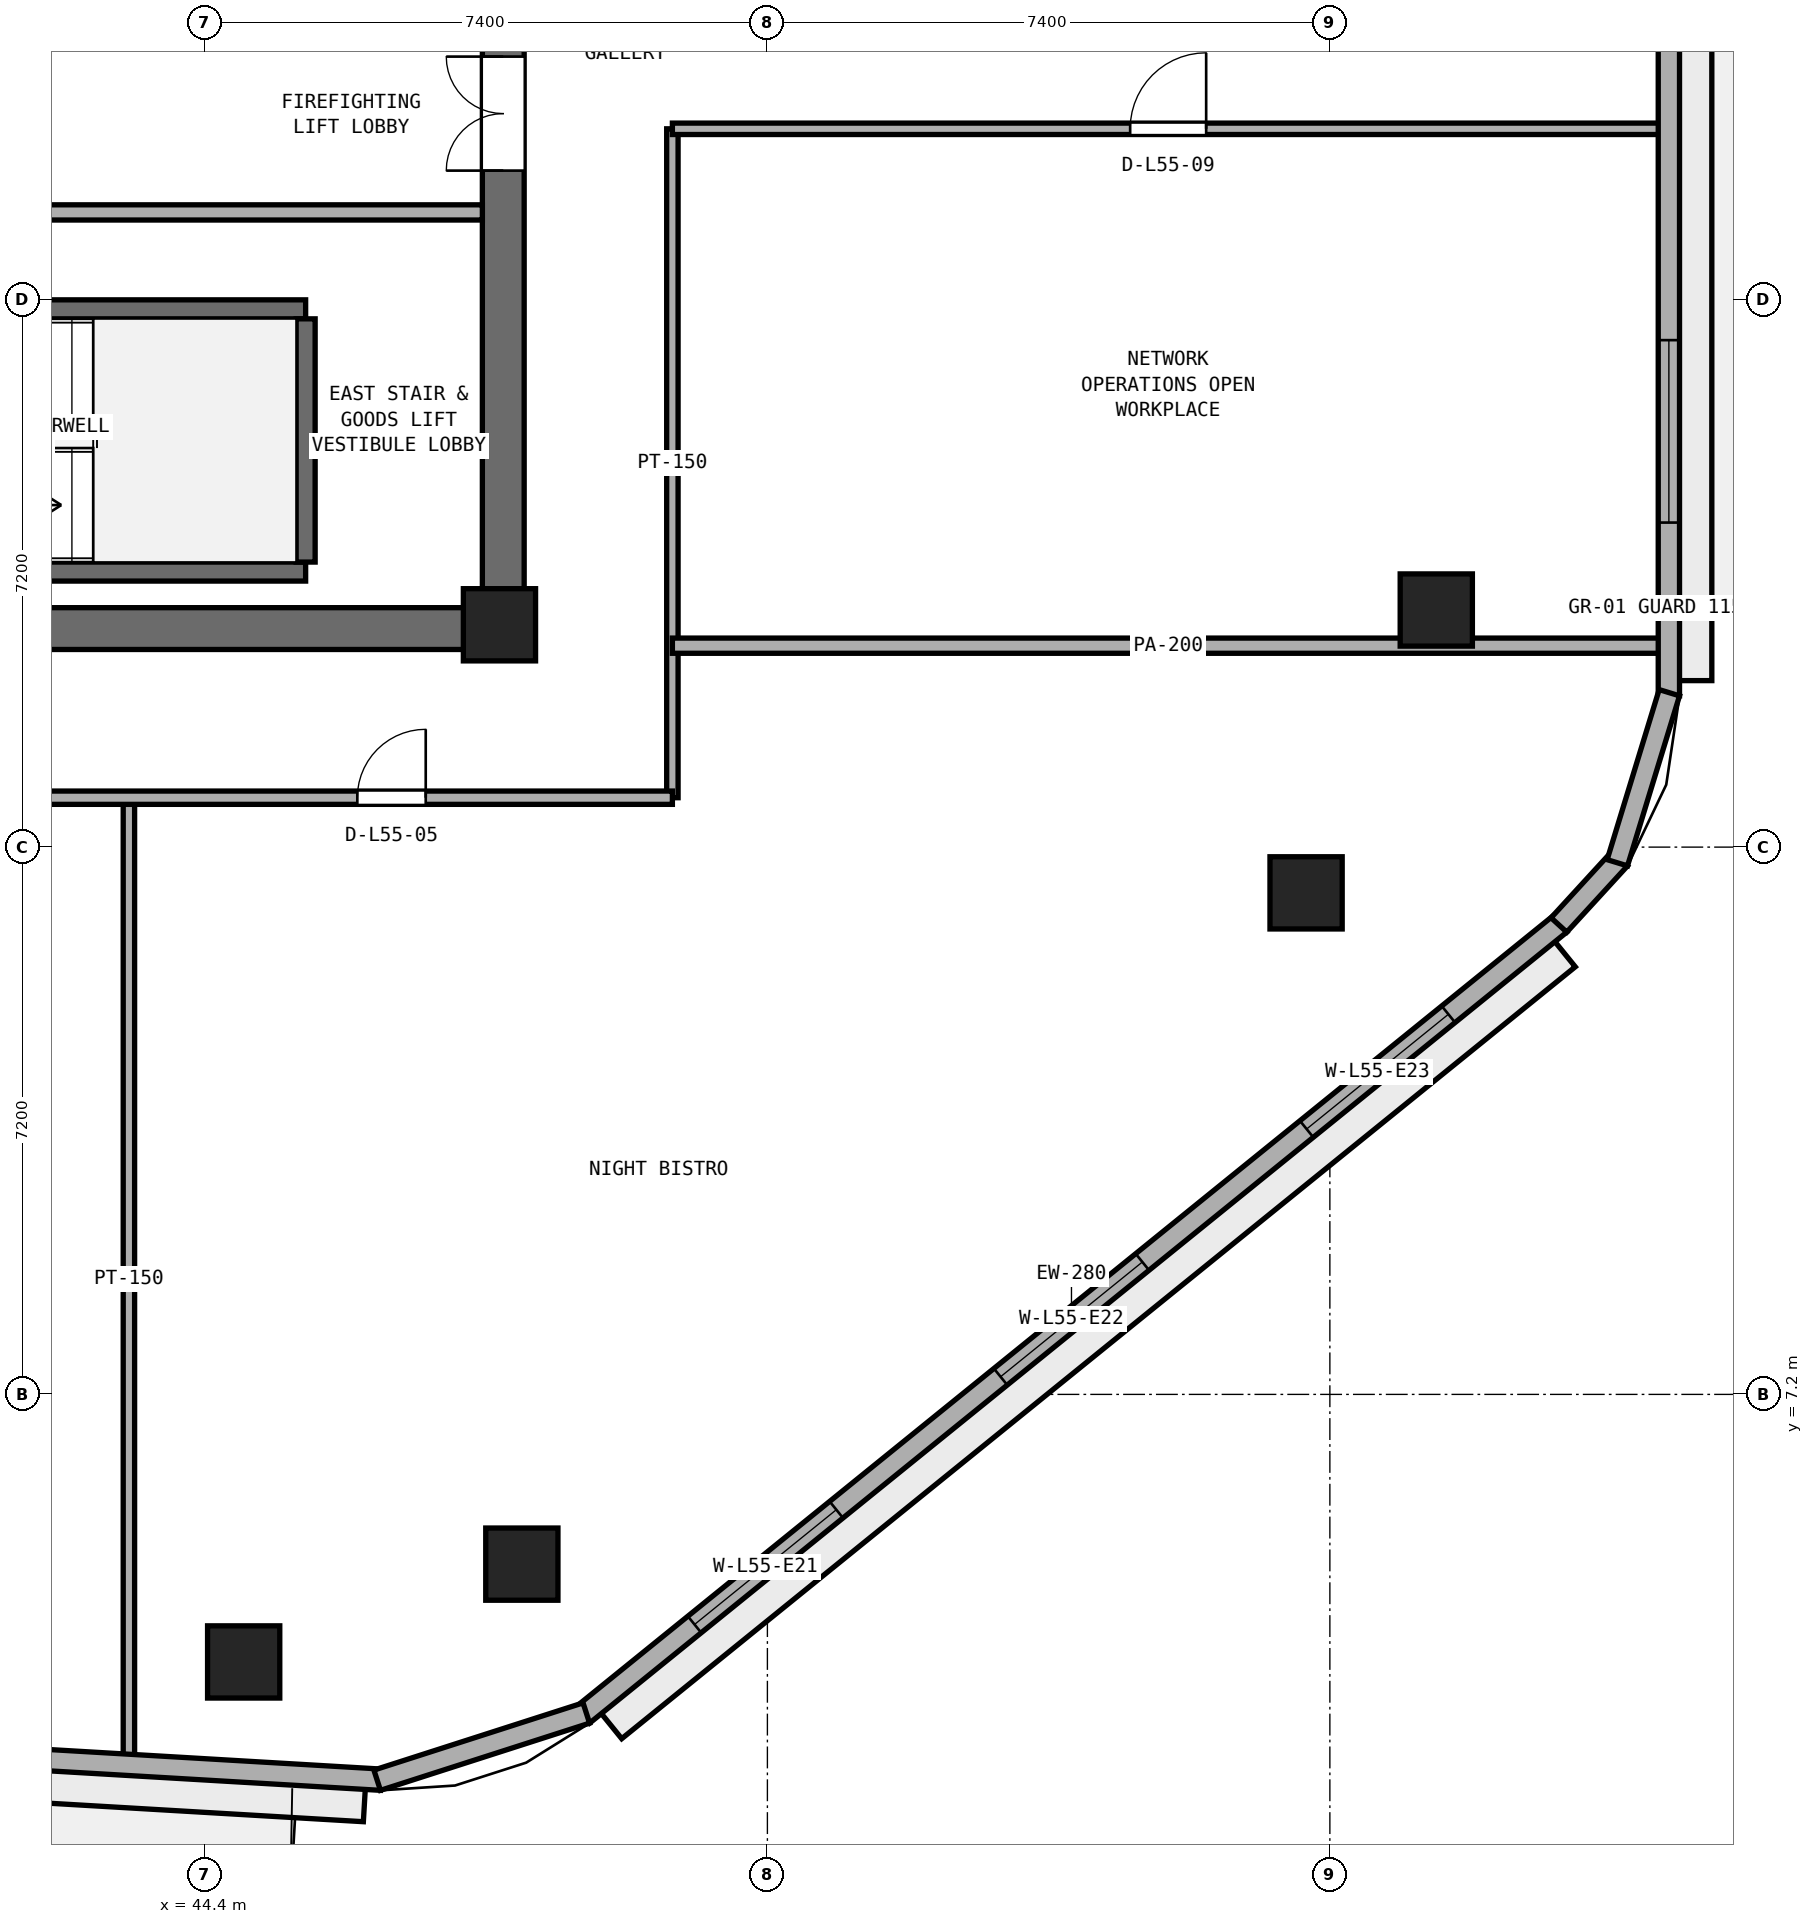
"""IFC4 building model, lengths in metres.
Left out: names, types, materials, properties, quantities, classifications, styles, units other than length and angle.
Written with IfcOpenShell. Run it as: python <this file> out.ifc"""

import sys

from ifc_helpers import new_model, si_unit, direction, frame, frame_2d, origin, origin_2d, place, context, subcontext, project, spatial, rectangle, extrude, element, fill, save


model = new_model("IFC4")
c1 = context("Model", 3, precision=1e-05, world=origin(), true_north=direction((0.0, 1.0)))
c2 = subcontext(c1, "Body", "Model", "MODEL_VIEW")
j1 = project(units=[si_unit("LENGTHUNIT", "METRE"), si_unit("PLANEANGLEUNIT", "RADIAN")], contexts=[c1])
p1 = place(None, origin())
s1 = spatial("IfcSite", under=j1, at=p1, CompositionType="ELEMENT")
p2 = place(p1, origin())
s2 = spatial("IfcBuilding", under=s1, at=p2, CompositionType="ELEMENT")
p3 = place(p2, frame((0.0, 0.0, 216.2)))
s3 = spatial("IfcBuildingStorey", under=s2, at=p3, CompositionType="ELEMENT", Elevation=216.2)
p4 = place(p3, frame((25.4, 17.275, 0.0), z_axis=(0.0, 0.0, 1.0), x_axis=(1.0, 0.0, 0.0)))
e1 = element("IfcWall", 1, at=p4, inside=s3, PredefinedType="SHEAR", context=c2, shape_type="SweptSolid", body=[
    extrude(rectangle(XDim=23.2, YDim=0.55, at=frame_2d((11.6, 0.0))), origin(), (0.0, 0.0, 1.0), 3.4),
])
p5 = place(p3, frame((48.325, 17.55, 0.0), z_axis=(0.0, 0.0, 1.0), x_axis=(0.0, 1.0, 0.0)))
e2 = element("IfcWall", 2, at=p5, inside=s3, PredefinedType="SHEAR", context=c2, shape_type="SweptSolid", body=[
    extrude(rectangle(XDim=15.3, YDim=0.55, at=frame_2d((7.65, 0.0))), origin(), (0.0, 0.0, 1.0), 3.4),
])
p6 = place(p5, frame((5.75, 0.0, 0.0)))
e3 = element("IfcOpeningElement", 3, at=p6, cuts=e2, PredefinedType="OPENING", context=c2, shape_type="SweptSolid", body=[
    extrude(rectangle(XDim=1.5, YDim=2.15, at=frame_2d((0.75, 1.075))), frame((0.0, 0.285, 0.0), z_axis=(0.0, -1.0, 0.0), x_axis=(1.0, 0.0, 0.0)), (0.0, 0.0, 1.0), 0.57),
])
p7 = place(p3, frame((48.275, 17.325, 0.0), z_axis=(0.0, 0.0, 1.0), x_axis=(1.0, 0.0, 0.0)))
e4 = element("IfcColumn", 4, at=p7, inside=s3, PredefinedType="PILASTER", context=c2, shape_type="SweptSolid", body=[
    extrude(rectangle(XDim=0.95, YDim=0.95, at=origin_2d()), origin(), (0.0, 0.0, 1.0), 3.8),
])
for number, where, z_axis, x_axis in (
    (5, (44.91, 3.68, 0.0), (0.0, 0.0, 1.0), (1.0, 0.0, 0.0)),
    (6, (48.57, 4.967, 0.0), (0.0, 0.0, 1.0), (1.0, 0.0, 0.0)),
    (7, (58.887, 13.798, 0.0), (0.0, 0.0, 1.0), (1.0, 0.0, 0.0)),
    (8, (60.6, 17.519, 0.0), (0.0, 0.0, 1.0), (1.0, 0.0, 0.0)),
):
    element("IfcColumn", number, at=place(p3, frame(where, z_axis=z_axis, x_axis=x_axis)), inside=s3, PredefinedType="COLUMN", context=c2, shape_type="SweptSolid", body=[
        extrude(rectangle(XDim=0.95, YDim=0.95, at=origin_2d()), origin(), (0.0, 0.0, 1.0), 3.8),
    ])
for number, where, z_axis, x_axis in (
    (9, (38.425, 18.025, 0.0), (0.0, 0.0, 1.0), (1.0, 0.0, 0.0)),
    (10, (38.425, 21.475, 0.0), (0.0, 0.0, 1.0), (1.0, 0.0, 0.0)),
):
    element("IfcWall", number, at=place(p3, frame(where, z_axis=z_axis, x_axis=x_axis)), inside=s3, PredefinedType="SHEAR", context=c2, shape_type="SweptSolid", body=[
        extrude(rectangle(XDim=7.3, YDim=0.25, at=frame_2d((3.65, 0.0))), origin(), (0.0, 0.0, 1.0), 3.4),
    ])
p8 = place(p3, frame((45.725, 18.15, 0.0), z_axis=(0.0, 0.0, 1.0), x_axis=(0.0, 1.0, 0.0)))
e11 = element("IfcWall", 11, at=p8, inside=s3, PredefinedType="SHEAR", context=c2, shape_type="SweptSolid", body=[
    extrude(rectangle(XDim=3.2, YDim=0.25, at=frame_2d((1.6, 0.0))), origin(), (0.0, 0.0, 1.0), 3.4),
])
p9 = place(p3, frame((42.0, 22.75, 0.0), z_axis=(0.0, 0.0, 1.0), x_axis=(1.0, 0.0, 0.0)))
e12 = element("IfcWall", 12, at=p9, inside=s3, PredefinedType="SOLIDWALL", context=c2, shape_type="SweptSolid", body=[
    extrude(rectangle(XDim=6.05, YDim=0.2, at=frame_2d((3.025, 0.0))), origin(), (0.0, 0.0, 1.0), 3.4),
])
p10 = place(p3, frame((50.55, 15.05, 0.0), z_axis=(0.0, 0.0, 1.0), x_axis=(0.0, 1.0, 0.0)))
e13 = element("IfcWall", 13, at=p10, inside=s3, PredefinedType="PARTITIONING", context=c2, shape_type="SweptSolid", body=[
    extrude(rectangle(XDim=8.8, YDim=0.15, at=frame_2d((4.4, 0.0))), origin(), (0.0, 0.0, 1.0), 3.4),
])
p11 = place(p3, frame((43.4, 2.391, 0.0), z_axis=(0.0, 0.0, 1.0), x_axis=(0.0, 1.0, 0.0)))
e14 = element("IfcWall", 14, at=p11, inside=s3, PredefinedType="PARTITIONING", context=c2, shape_type="SweptSolid", body=[
    extrude(rectangle(XDim=12.659, YDim=0.15, at=frame_2d((6.33, 0.0))), origin(), (0.0, 0.0, 1.0), 3.4),
])
p12 = place(p3, frame((23.45, 15.05, 0.0), z_axis=(0.0, 0.0, 1.0), x_axis=(1.0, 0.0, 0.0)))
e15 = element("IfcWall", 15, at=p12, inside=s3, PredefinedType="PARTITIONING", context=c2, shape_type="SweptSolid", body=[
    extrude(rectangle(XDim=27.1, YDim=0.175, at=frame_2d((13.55, 0.0))), origin(), (0.0, 0.0, 1.0), 3.4),
])
p13 = place(p12, frame((3.895, 0.0, 0.0)))
e16 = element("IfcOpeningElement", 16, at=p13, cuts=e15, PredefinedType="OPENING", context=c2, shape_type="SweptSolid", body=[
    extrude(rectangle(XDim=0.9, YDim=2.1, at=frame_2d((0.45, 1.05))), frame((0.0, 0.097, 0.0), z_axis=(0.0, -1.0, 0.0), x_axis=(1.0, 0.0, 0.0)), (0.0, 0.0, 1.0), 0.195),
])
p14 = place(p12, frame((13.75, 0.0, 0.0)))
e17 = element("IfcOpeningElement", 17, at=p14, cuts=e15, PredefinedType="OPENING", context=c2, shape_type="SweptSolid", body=[
    extrude(rectangle(XDim=0.9, YDim=2.1, at=frame_2d((0.45, 1.05))), frame((0.0, 0.097, 0.0), z_axis=(0.0, -1.0, 0.0), x_axis=(1.0, 0.0, 0.0)), (0.0, 0.0, 1.0), 0.195),
])
p15 = place(p12, frame((22.955, 0.0, 0.0)))
e18 = element("IfcOpeningElement", 18, at=p15, cuts=e15, PredefinedType="OPENING", context=c2, shape_type="SweptSolid", body=[
    extrude(rectangle(XDim=0.9, YDim=2.1, at=frame_2d((0.45, 1.05))), frame((0.0, 0.097, 0.0), z_axis=(0.0, -1.0, 0.0), x_axis=(1.0, 0.0, 0.0)), (0.0, 0.0, 1.0), 0.195),
])
p16 = place(p3, frame((50.55, 17.05, 0.0), z_axis=(0.0, 0.0, 1.0), x_axis=(1.0, 0.0, 0.0)))
e19 = element("IfcWall", 19, at=p16, inside=s3, PredefinedType="PARTITIONING", context=c2, shape_type="SweptSolid", body=[
    extrude(rectangle(XDim=13.045, YDim=0.2, at=frame_2d((6.522, 0.0))), origin(), (0.0, 0.0, 1.0), 3.4),
])
p17 = place(p3, frame((50.55, 23.85, 0.0), z_axis=(0.0, 0.0, 1.0), x_axis=(1.0, 0.0, 0.0)))
e20 = element("IfcWall", 20, at=p17, inside=s3, PredefinedType="PARTITIONING", context=c2, shape_type="SweptSolid", body=[
    extrude(rectangle(XDim=13.045, YDim=0.15, at=frame_2d((6.522, 0.0))), origin(), (0.0, 0.0, 1.0), 3.4),
])
p18 = place(p17, frame((6.022, 0.0, 0.0)))
e21 = element("IfcOpeningElement", 21, at=p18, cuts=e20, PredefinedType="OPENING", context=c2, shape_type="SweptSolid", body=[
    extrude(rectangle(XDim=1.0, YDim=2.12, at=frame_2d((0.5, 1.06))), frame((0.0, 0.085, 0.0), z_axis=(0.0, -1.0, 0.0), x_axis=(1.0, 0.0, 0.0)), (0.0, 0.0, 1.0), 0.17),
])
p19 = place(p3, frame((28.966, 3.175, 0.0), z_axis=(0.0, 0.0, 1.0), x_axis=(0.998274467859, -0.058720412304, 0.0)))
e22 = element("IfcWall", 22, at=p19, inside=s3, PredefinedType="STANDARD", context=c2, shape_type="SweptSolid", body=[
    extrude(rectangle(XDim=17.782, YDim=0.28, at=frame_2d((8.891, 0.0))), origin(), (0.0, 0.0, 1.0), 3.4),
])
p20 = place(p19, frame((8.341, 0.0, 0.0)))
e23 = element("IfcOpeningElement", 23, at=p20, cuts=e22, PredefinedType="OPENING", context=c2, shape_type="SweptSolid", body=[
    extrude(rectangle(XDim=1.1, YDim=2.2, at=frame_2d((0.55, 1.1))), frame((0.0, 0.15, 0.0), z_axis=(0.0, -1.0, 0.0), x_axis=(1.0, 0.0, 0.0)), (0.0, 0.0, 1.0), 0.3),
])
p21 = place(p3, frame((49.372, 2.984, 0.0), z_axis=(0.0, 0.0, 1.0), x_axis=(0.777278899851, 0.629156190343, 0.0)))
e24 = element("IfcWall", 24, at=p21, inside=s3, PredefinedType="STANDARD", context=c2, shape_type="SweptSolid", body=[
    extrude(rectangle(XDim=16.54, YDim=0.28, at=frame_2d((8.27, 0.0))), origin(), (0.0, 0.0, 1.0), 3.4),
])
p22 = place(p21, frame((1.89, 0.0, 0.9)))
e25 = element("IfcOpeningElement", 25, at=p22, cuts=e24, PredefinedType="OPENING", context=c2, shape_type="SweptSolid", body=[
    extrude(rectangle(XDim=2.4, YDim=1.75, at=frame_2d((1.2, 0.875))), frame((0.0, 0.15, 0.0), z_axis=(0.0, -1.0, 0.0), x_axis=(1.0, 0.0, 0.0)), (0.0, 0.0, 1.0), 0.3),
])
p23 = place(p21, frame((7.07, 0.0, 0.9)))
e26 = element("IfcOpeningElement", 26, at=p23, cuts=e24, PredefinedType="OPENING", context=c2, shape_type="SweptSolid", body=[
    extrude(rectangle(XDim=2.4, YDim=1.75, at=frame_2d((1.2, 0.875))), frame((0.0, 0.15, 0.0), z_axis=(0.0, -1.0, 0.0), x_axis=(1.0, 0.0, 0.0)), (0.0, 0.0, 1.0), 0.3),
])
p24 = place(p21, frame((12.25, 0.0, 0.9)))
e27 = element("IfcOpeningElement", 27, at=p24, cuts=e24, PredefinedType="OPENING", context=c2, shape_type="SweptSolid", body=[
    extrude(rectangle(XDim=2.4, YDim=1.75, at=frame_2d((1.2, 0.875))), frame((0.0, 0.15, 0.0), z_axis=(0.0, -1.0, 0.0), x_axis=(1.0, 0.0, 0.0)), (0.0, 0.0, 1.0), 0.3),
])
p25 = place(p3, frame((63.66, 16.39, 0.0), z_axis=(0.0, 0.0, 1.0), x_axis=(0.0, 1.0, 0.0)))
e28 = element("IfcWall", 28, at=p25, inside=s3, PredefinedType="STANDARD", context=c2, shape_type="SweptSolid", body=[
    extrude(rectangle(XDim=18.876, YDim=0.28, at=frame_2d((9.438, 0.0))), origin(), (0.0, 0.0, 1.0), 3.4),
])
p26 = place(p25, frame((8.588, 0.0, 0.0)))
e29 = element("IfcOpeningElement", 29, at=p26, cuts=e28, PredefinedType="OPENING", context=c2, shape_type="SweptSolid", body=[
    extrude(rectangle(XDim=1.1, YDim=2.2, at=frame_2d((0.55, 1.1))), frame((0.0, 0.15, 0.0), z_axis=(0.0, -1.0, 0.0), x_axis=(1.0, 0.0, 0.0)), (0.0, 0.0, 1.0), 0.3),
])
p27 = place(p25, frame((2.279, 0.0, 0.9)))
e30 = element("IfcOpeningElement", 30, at=p27, cuts=e28, PredefinedType="OPENING", context=c2, shape_type="SweptSolid", body=[
    extrude(rectangle(XDim=2.4, YDim=1.75, at=frame_2d((1.2, 0.875))), frame((0.0, 0.15, 0.0), z_axis=(0.0, -1.0, 0.0), x_axis=(1.0, 0.0, 0.0)), (0.0, 0.0, 1.0), 0.3),
])
p28 = place(p25, frame((14.197, 0.0, 0.9)))
e31 = element("IfcOpeningElement", 31, at=p28, cuts=e28, PredefinedType="OPENING", context=c2, shape_type="SweptSolid", body=[
    extrude(rectangle(XDim=2.4, YDim=1.75, at=frame_2d((1.2, 0.875))), frame((0.0, 0.15, 0.0), z_axis=(0.0, -1.0, 0.0), x_axis=(1.0, 0.0, 0.0)), (0.0, 0.0, 1.0), 0.3),
])
p29 = place(p3, frame((46.666, 2.124, 0.0), z_axis=(0.0, 0.0, 1.0), x_axis=(0.952065470694, 0.305894327363, 0.0)))
e32 = element("IfcWall", 32, at=p29, inside=s3, PredefinedType="STANDARD", context=c2, shape_type="SweptSolid", body=[
    extrude(rectangle(XDim=2.89, YDim=0.28, at=frame_2d((1.445, 0.0))), origin(), (0.0, 0.0, 1.0), 3.4),
])
p30 = place(p3, frame((62.213, 13.376, 0.0), z_axis=(0.0, 0.0, 1.0), x_axis=(0.675790054291, 0.737094161232, 0.0)))
e33 = element("IfcWall", 33, at=p30, inside=s3, PredefinedType="STANDARD", context=c2, shape_type="SweptSolid", body=[
    extrude(rectangle(XDim=1.183, YDim=0.28, at=frame_2d((0.591, 0.0))), origin(), (0.0, 0.0, 1.0), 3.4),
])
p31 = place(p3, frame((62.982, 14.194, 0.0), z_axis=(0.0, 0.0, 1.0), x_axis=(0.292398811023, 0.956296468315, 0.0)))
e34 = element("IfcWall", 34, at=p31, inside=s3, PredefinedType="STANDARD", context=c2, shape_type="SweptSolid", body=[
    extrude(rectangle(XDim=2.34, YDim=0.28, at=frame_2d((1.17, 0.0))), origin(), (0.0, 0.0, 1.0), 3.4),
])
p32 = place(p6, origin())
e35 = element("IfcDoor", 35, at=p32, inside=s3, OperationType="DOUBLE_DOOR_SINGLE_SWING", PredefinedType="DOOR", context=c2, shape_type="SweptSolid", body=[
    extrude(rectangle(XDim=1.5, YDim=2.15, at=frame_2d((0.75, 1.075))), frame((0.0, 0.025, 0.0), z_axis=(0.0, -1.0, 0.0), x_axis=(1.0, 0.0, 0.0)), (0.0, 0.0, 1.0), 0.05),
])
fill(e3, e35)
p33 = place(p15, origin())
e36 = element("IfcDoor", 36, at=p33, inside=s3, OperationType="SINGLE_SWING_RIGHT", PredefinedType="DOOR", context=c2, shape_type="SweptSolid", body=[
    extrude(rectangle(XDim=0.9, YDim=2.1, at=frame_2d((0.45, 1.05))), frame((0.0, 0.025, 0.0), z_axis=(0.0, -1.0, 0.0), x_axis=(1.0, 0.0, 0.0)), (0.0, 0.0, 1.0), 0.05),
])
fill(e18, e36)
p34 = place(p18, origin())
e37 = element("IfcDoor", 37, at=p34, inside=s3, OperationType="SINGLE_SWING_RIGHT", PredefinedType="DOOR", context=c2, shape_type="SweptSolid", body=[
    extrude(rectangle(XDim=1.0, YDim=2.12, at=frame_2d((0.5, 1.06))), frame((0.0, 0.025, 0.0), z_axis=(0.0, -1.0, 0.0), x_axis=(1.0, 0.0, 0.0)), (0.0, 0.0, 1.0), 0.05),
])
fill(e21, e37)
p35 = place(p22, origin())
e38 = element("IfcWindow", 38, at=p35, inside=s3, PartitioningType="SINGLE_PANEL", PredefinedType="WINDOW", context=c2, shape_type="SweptSolid", body=[
    extrude(rectangle(XDim=2.4, YDim=1.75, at=frame_2d((1.2, 0.875))), frame((0.0, 0.03, 0.0), z_axis=(0.0, -1.0, 0.0), x_axis=(1.0, 0.0, 0.0)), (0.0, 0.0, 1.0), 0.06),
])
fill(e25, e38)
p36 = place(p23, origin())
e39 = element("IfcWindow", 39, at=p36, inside=s3, PartitioningType="SINGLE_PANEL", PredefinedType="WINDOW", context=c2, shape_type="SweptSolid", body=[
    extrude(rectangle(XDim=2.4, YDim=1.75, at=frame_2d((1.2, 0.875))), frame((0.0, 0.03, 0.0), z_axis=(0.0, -1.0, 0.0), x_axis=(1.0, 0.0, 0.0)), (0.0, 0.0, 1.0), 0.06),
])
fill(e26, e39)
p37 = place(p24, origin())
e40 = element("IfcWindow", 40, at=p37, inside=s3, PartitioningType="SINGLE_PANEL", PredefinedType="WINDOW", context=c2, shape_type="SweptSolid", body=[
    extrude(rectangle(XDim=2.4, YDim=1.75, at=frame_2d((1.2, 0.875))), frame((0.0, 0.03, 0.0), z_axis=(0.0, -1.0, 0.0), x_axis=(1.0, 0.0, 0.0)), (0.0, 0.0, 1.0), 0.06),
])
fill(e27, e40)
p38 = place(p27, origin())
e41 = element("IfcWindow", 41, at=p38, inside=s3, PartitioningType="SINGLE_PANEL", PredefinedType="WINDOW", context=c2, shape_type="SweptSolid", body=[
    extrude(rectangle(XDim=2.4, YDim=1.75, at=frame_2d((1.2, 0.875))), frame((0.0, 0.03, 0.0), z_axis=(0.0, -1.0, 0.0), x_axis=(1.0, 0.0, 0.0)), (0.0, 0.0, 1.0), 0.06),
])
fill(e30, e41)
save(model, sys.argv[1])
